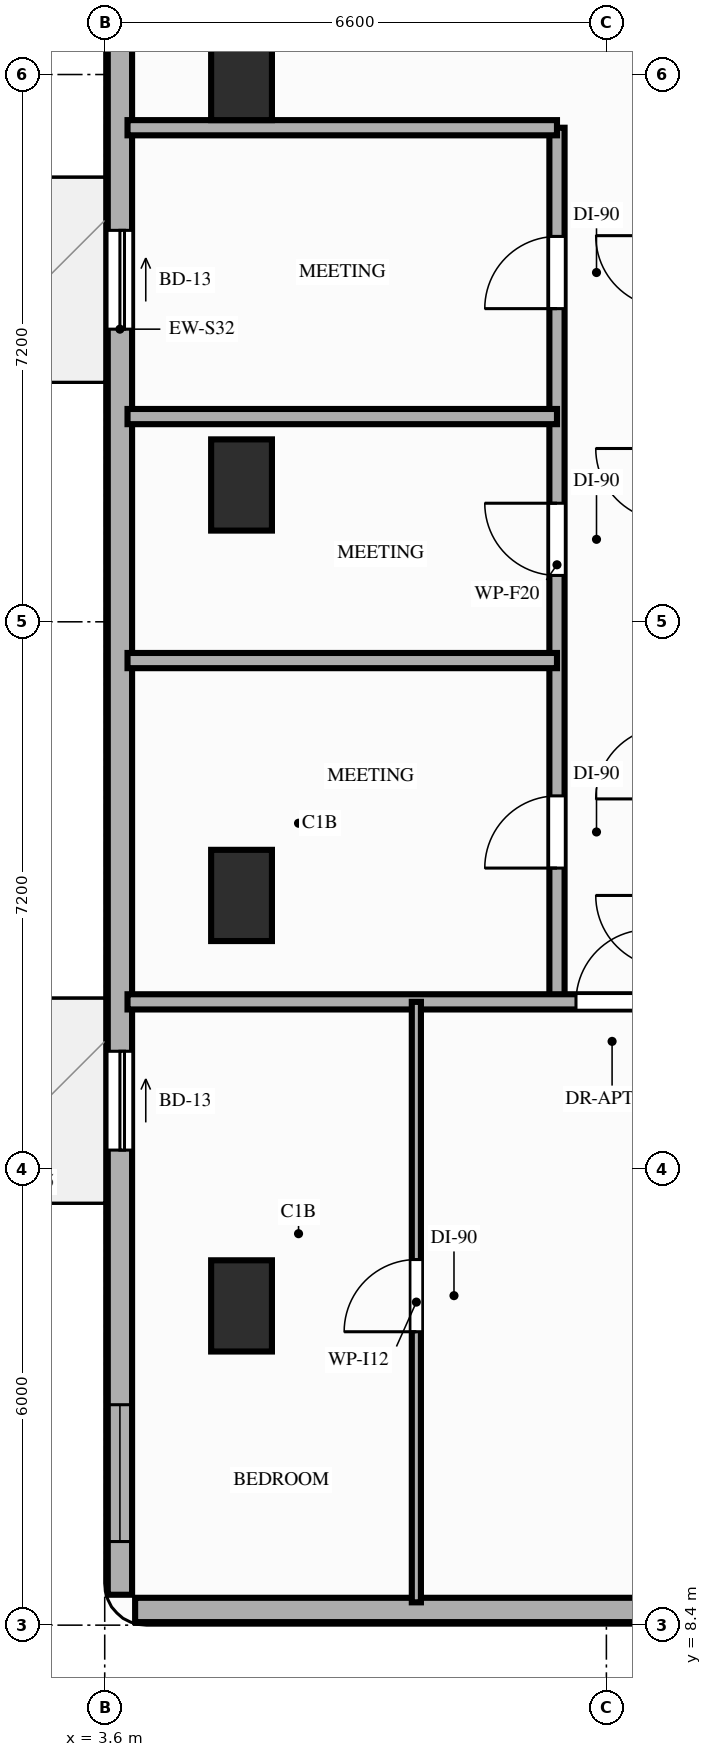
"""IFC4 building model, lengths in metres.
Left out: names, types, materials, properties, quantities, classifications, styles, units other than length and angle.
Written with IfcOpenShell. Run it as: python <this file> out.ifc"""

import sys

from ifc_helpers import new_model, si_unit, direction, frame, frame_2d, origin, origin_2d, place, context, subcontext, project, spatial, rectangle, extrude, element, fill, save


model = new_model("IFC4")
c1 = context("Model", 3, precision=1e-05, world=origin(), true_north=direction((0.0, 1.0)))
c2 = subcontext(c1, "Body", "Model", "MODEL_VIEW")
j1 = project(units=[si_unit("LENGTHUNIT", "METRE"), si_unit("PLANEANGLEUNIT", "RADIAN")], contexts=[c1])
p1 = place(None, origin())
s1 = spatial("IfcSite", under=j1, at=p1, CompositionType="ELEMENT")
p2 = place(p1, origin())
s2 = spatial("IfcBuilding", under=s1, at=p2, CompositionType="ELEMENT")
p3 = place(p2, frame((0.0, 0.0, 89.8)))
s3 = spatial("IfcBuildingStorey", under=s2, at=p3, CompositionType="ELEMENT", Elevation=89.8)
for number, where, z_axis, x_axis in (
    (1, (5.4, 12.6, 0.0), (0.0, 0.0, 1.0), (1.0, 0.0, 0.0)),
    (2, (5.4, 18.0, 0.0), (0.0, 0.0, 1.0), (1.0, 0.0, 0.0)),
    (3, (5.4, 23.4, 0.0), (0.0, 0.0, 1.0), (1.0, 0.0, 0.0)),
    (4, (5.4, 28.8, 0.0), (0.0, 0.0, 1.0), (1.0, 0.0, 0.0)),
):
    element("IfcColumn", number, at=place(p3, frame(where, z_axis=z_axis, x_axis=x_axis)), inside=s3, PredefinedType="COLUMN", context=c2, shape_type="SweptSolid", body=[
        extrude(rectangle(XDim=0.8, YDim=1.2, at=origin_2d()), origin(), (0.0, 0.0, 1.0), 3.2),
    ])
p4 = place(p3, frame((4.0, 8.6, 0.0), z_axis=(0.0, 0.0, 1.0), x_axis=(1.0, 0.0, 0.0)))
e5 = element("IfcWall", 5, at=p4, inside=s3, PredefinedType="STANDARD", context=c2, shape_type="SweptSolid", body=[
    extrude(rectangle(XDim=15.8, YDim=0.32, at=frame_2d((7.9, 0.0))), origin(), (0.0, 0.0, 1.0), 3.02),
])
p5 = place(p4, frame((6.85, 0.0, 0.85)))
e6 = element("IfcOpeningElement", 6, at=p5, cuts=e5, PredefinedType="OPENING", context=c2, shape_type="SweptSolid", body=[
    extrude(rectangle(XDim=1.8, YDim=1.75, at=frame_2d((0.9, 0.875))), frame((0.0, 0.17, 0.0), z_axis=(0.0, -1.0, 0.0), x_axis=(1.0, 0.0, 0.0)), (0.0, 0.0, 1.0), 0.34),
])
p6 = place(p3, frame((3.8, 42.1, 0.0), z_axis=(0.0, 0.0, 1.0), x_axis=(0.0, -1.0, 0.0)))
e7 = element("IfcWall", 7, at=p6, inside=s3, PredefinedType="STANDARD", context=c2, shape_type="SweptSolid", body=[
    extrude(rectangle(XDim=33.3, YDim=0.32, at=frame_2d((16.65, 0.0))), origin(), (0.0, 0.0, 1.0), 2.7),
])
p7 = place(p6, frame((26.15, 0.0, 0.0)))
e8 = element("IfcOpeningElement", 8, at=p7, cuts=e7, PredefinedType="OPENING", context=c2, shape_type="SweptSolid", body=[
    extrude(rectangle(XDim=1.3, YDim=2.08, at=frame_2d((0.65, 1.04))), frame((0.0, 0.17, 0.0), z_axis=(0.0, -1.0, 0.0), x_axis=(1.0, 0.0, 0.0)), (0.0, 0.0, 1.0), 0.34),
])
p8 = place(p6, frame((15.35, 0.0, 0.0)))
e9 = element("IfcOpeningElement", 9, at=p8, cuts=e7, PredefinedType="OPENING", context=c2, shape_type="SweptSolid", body=[
    extrude(rectangle(XDim=1.3, YDim=2.08, at=frame_2d((0.65, 1.04))), frame((0.0, 0.17, 0.0), z_axis=(0.0, -1.0, 0.0), x_axis=(1.0, 0.0, 0.0)), (0.0, 0.0, 1.0), 0.34),
])
p9 = place(p6, frame((30.8, 0.0, 0.85)))
e10 = element("IfcOpeningElement", 10, at=p9, cuts=e7, PredefinedType="OPENING", context=c2, shape_type="SweptSolid", body=[
    extrude(rectangle(XDim=1.8, YDim=1.6, at=frame_2d((0.9, 0.8))), frame((0.0, 0.17, 0.0), z_axis=(0.0, -1.0, 0.0), x_axis=(1.0, 0.0, 0.0)), (0.0, 0.0, 1.0), 0.34),
])
p10 = place(p6, frame((9.9, 0.0, 0.85)))
e11 = element("IfcOpeningElement", 11, at=p10, cuts=e7, PredefinedType="OPENING", context=c2, shape_type="SweptSolid", body=[
    extrude(rectangle(XDim=1.8, YDim=1.6, at=frame_2d((0.9, 0.8))), frame((0.0, 0.17, 0.0), z_axis=(0.0, -1.0, 0.0), x_axis=(1.0, 0.0, 0.0)), (0.0, 0.0, 1.0), 0.34),
])
p11 = place(p6, frame((3.8, 0.0, 0.85)))
e12 = element("IfcOpeningElement", 12, at=p11, cuts=e7, PredefinedType="OPENING", context=c2, shape_type="SweptSolid", body=[
    extrude(rectangle(XDim=1.8, YDim=1.6, at=frame_2d((0.9, 0.8))), frame((0.0, 0.17, 0.0), z_axis=(0.0, -1.0, 0.0), x_axis=(1.0, 0.0, 0.0)), (0.0, 0.0, 1.0), 0.34),
])
p12 = place(p3, frame((9.55, 16.6, 0.0), z_axis=(0.0, 0.0, 1.0), x_axis=(0.0, 1.0, 0.0)))
e13 = element("IfcWall", 13, at=p12, inside=s3, PredefinedType="PARTITIONING", context=c2, shape_type="SweptSolid", body=[
    extrude(rectangle(XDim=11.5, YDim=0.2, at=frame_2d((5.75, 0.0))), origin(), (0.0, 0.0, 1.0), 2.4),
])
p13 = place(p12, frame((1.76, 0.0, 0.0)))
e14 = element("IfcOpeningElement", 14, at=p13, cuts=e13, PredefinedType="OPENING", context=c2, shape_type="SweptSolid", body=[
    extrude(rectangle(XDim=0.95, YDim=2.15, at=frame_2d((0.475, 1.075))), frame((0.0, 0.11, 0.0), z_axis=(0.0, -1.0, 0.0), x_axis=(1.0, 0.0, 0.0)), (0.0, 0.0, 1.0), 0.22),
])
p14 = place(p12, frame((5.61, 0.0, 0.0)))
e15 = element("IfcOpeningElement", 15, at=p14, cuts=e13, PredefinedType="OPENING", context=c2, shape_type="SweptSolid", body=[
    extrude(rectangle(XDim=0.95, YDim=2.15, at=frame_2d((0.475, 1.075))), frame((0.0, 0.11, 0.0), z_axis=(0.0, -1.0, 0.0), x_axis=(1.0, 0.0, 0.0)), (0.0, 0.0, 1.0), 0.22),
])
p15 = place(p12, frame((9.12, 0.0, 0.0)))
e16 = element("IfcOpeningElement", 16, at=p15, cuts=e13, PredefinedType="OPENING", context=c2, shape_type="SweptSolid", body=[
    extrude(rectangle(XDim=0.95, YDim=2.15, at=frame_2d((0.475, 1.075))), frame((0.0, 0.11, 0.0), z_axis=(0.0, -1.0, 0.0), x_axis=(1.0, 0.0, 0.0)), (0.0, 0.0, 1.0), 0.22),
])
p16 = place(p3, frame((3.9, 16.6, 0.0), z_axis=(0.0, 0.0, 1.0), x_axis=(1.0, 0.0, 0.0)))
e17 = element("IfcWall", 17, at=p16, inside=s3, PredefinedType="PARTITIONING", context=c2, shape_type="SweptSolid", body=[
    extrude(rectangle(XDim=16.0, YDim=0.2, at=frame_2d((8.0, 0.0))), origin(), (0.0, 0.0, 1.0), 2.4),
])
p17 = place(p16, frame((5.9, 0.0, 0.0)))
e18 = element("IfcOpeningElement", 18, at=p17, cuts=e17, PredefinedType="OPENING", context=c2, shape_type="SweptSolid", body=[
    extrude(rectangle(XDim=0.95, YDim=2.15, at=frame_2d((0.475, 1.075))), frame((0.0, 0.11, 0.0), z_axis=(0.0, -1.0, 0.0), x_axis=(1.0, 0.0, 0.0)), (0.0, 0.0, 1.0), 0.22),
])
for number, where, z_axis, x_axis in (
    (19, (3.9, 28.1, 0.0), (0.0, 0.0, 1.0), (1.0, 0.0, 0.0)),
    (20, (3.9, 21.09, 0.0), (0.0, 0.0, 1.0), (1.0, 0.0, 0.0)),
    (21, (3.9, 24.3, 0.0), (0.0, 0.0, 1.0), (1.0, 0.0, 0.0)),
):
    element("IfcWall", number, at=place(p3, frame(where, z_axis=z_axis, x_axis=x_axis)), inside=s3, PredefinedType="PARTITIONING", context=c2, shape_type="SweptSolid", body=[
        extrude(rectangle(XDim=5.65, YDim=0.2, at=frame_2d((2.825, 0.0))), origin(), (0.0, 0.0, 1.0), 2.4),
    ])
p18 = place(p3, frame((7.7, 8.7, 0.0), z_axis=(0.0, 0.0, 1.0), x_axis=(0.0, 1.0, 0.0)))
e22 = element("IfcWall", 22, at=p18, inside=s3, PredefinedType="PARTITIONING", context=c2, shape_type="SweptSolid", body=[
    extrude(rectangle(XDim=7.9, YDim=0.12, at=frame_2d((3.95, 0.0))), origin(), (0.0, 0.0, 1.0), 2.4),
])
p19 = place(p18, frame((3.56, 0.0, 0.0)))
e23 = element("IfcOpeningElement", 23, at=p19, cuts=e22, PredefinedType="OPENING", context=c2, shape_type="SweptSolid", body=[
    extrude(rectangle(XDim=0.95, YDim=2.15, at=frame_2d((0.475, 1.075))), frame((0.0, 0.07, 0.0), z_axis=(0.0, -1.0, 0.0), x_axis=(1.0, 0.0, 0.0)), (0.0, 0.0, 1.0), 0.14),
])
p20 = place(p7, origin())
e24 = element("IfcDoor", 24, at=p20, inside=s3, OperationType="SLIDING_TO_LEFT", PredefinedType="DOOR", context=c2, shape_type="SweptSolid", body=[
    extrude(rectangle(XDim=1.3, YDim=2.08, at=frame_2d((0.65, 1.04))), frame((0.0, 0.025, 0.0), z_axis=(0.0, -1.0, 0.0), x_axis=(1.0, 0.0, 0.0)), (0.0, 0.0, 1.0), 0.05),
])
fill(e8, e24)
p21 = place(p8, origin())
e25 = element("IfcDoor", 25, at=p21, inside=s3, OperationType="SLIDING_TO_LEFT", PredefinedType="DOOR", context=c2, shape_type="SweptSolid", body=[
    extrude(rectangle(XDim=1.3, YDim=2.08, at=frame_2d((0.65, 1.04))), frame((0.0, 0.025, 0.0), z_axis=(0.0, -1.0, 0.0), x_axis=(1.0, 0.0, 0.0)), (0.0, 0.0, 1.0), 0.05),
])
fill(e9, e25)
p22 = place(p9, origin())
e26 = element("IfcWindow", 26, at=p22, inside=s3, PartitioningType="SINGLE_PANEL", PredefinedType="WINDOW", context=c2, shape_type="SweptSolid", body=[
    extrude(rectangle(XDim=1.8, YDim=1.6, at=frame_2d((0.9, 0.8))), frame((0.0, 0.03, 0.0), z_axis=(0.0, -1.0, 0.0), x_axis=(1.0, 0.0, 0.0)), (0.0, 0.0, 1.0), 0.06),
])
fill(e10, e26)
p23 = place(p13, origin())
e27 = element("IfcDoor", 27, at=p23, inside=s3, OperationType="SINGLE_SWING_LEFT", PredefinedType="DOOR", context=c2, shape_type="SweptSolid", body=[
    extrude(rectangle(XDim=0.95, YDim=2.15, at=frame_2d((0.475, 1.075))), frame((0.0, 0.025, 0.0), z_axis=(0.0, -1.0, 0.0), x_axis=(1.0, 0.0, 0.0)), (0.0, 0.0, 1.0), 0.05),
])
fill(e14, e27)
p24 = place(p14, origin())
e28 = element("IfcDoor", 28, at=p24, inside=s3, OperationType="SINGLE_SWING_RIGHT", PredefinedType="DOOR", context=c2, shape_type="SweptSolid", body=[
    extrude(rectangle(XDim=0.95, YDim=2.15, at=frame_2d((0.475, 1.075))), frame((0.0, 0.025, 0.0), z_axis=(0.0, -1.0, 0.0), x_axis=(1.0, 0.0, 0.0)), (0.0, 0.0, 1.0), 0.05),
])
fill(e15, e28)
p25 = place(p15, origin())
e29 = element("IfcDoor", 29, at=p25, inside=s3, OperationType="SINGLE_SWING_LEFT", PredefinedType="DOOR", context=c2, shape_type="SweptSolid", body=[
    extrude(rectangle(XDim=0.95, YDim=2.15, at=frame_2d((0.475, 1.075))), frame((0.0, 0.025, 0.0), z_axis=(0.0, -1.0, 0.0), x_axis=(1.0, 0.0, 0.0)), (0.0, 0.0, 1.0), 0.05),
])
fill(e16, e29)
p26 = place(p17, origin())
e30 = element("IfcDoor", 30, at=p26, inside=s3, OperationType="SINGLE_SWING_RIGHT", PredefinedType="DOOR", context=c2, shape_type="SweptSolid", body=[
    extrude(rectangle(XDim=0.95, YDim=2.15, at=frame_2d((0.475, 1.075))), frame((0.0, 0.025, 0.0), z_axis=(0.0, -1.0, 0.0), x_axis=(1.0, 0.0, 0.0)), (0.0, 0.0, 1.0), 0.05),
])
fill(e18, e30)
p27 = place(p19, origin())
e31 = element("IfcDoor", 31, at=p27, inside=s3, OperationType="SINGLE_SWING_LEFT", PredefinedType="DOOR", context=c2, shape_type="SweptSolid", body=[
    extrude(rectangle(XDim=0.95, YDim=2.15, at=frame_2d((0.475, 1.075))), frame((0.0, 0.025, 0.0), z_axis=(0.0, -1.0, 0.0), x_axis=(1.0, 0.0, 0.0)), (0.0, 0.0, 1.0), 0.05),
])
fill(e23, e31)
save(model, sys.argv[1])
